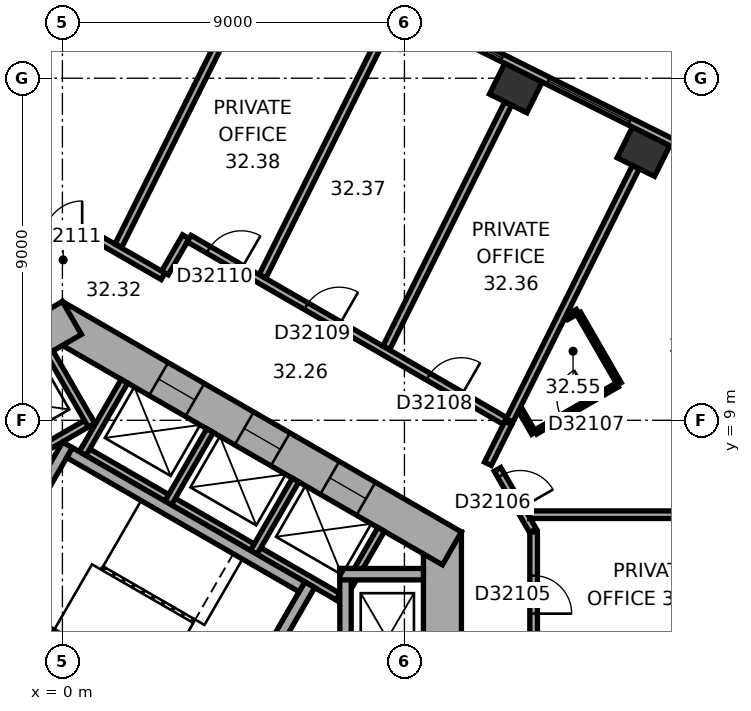
"""IFC4 building model, lengths in metres.
Left out: names, types, materials, properties, quantities, classifications, styles, units other than length and angle.
Written with IfcOpenShell. Run it as: python <this file> out.ifc"""

import sys

from ifc_helpers import new_model, si_unit, direction, frame, frame_2d, origin, origin_2d, place, context, subcontext, project, spatial, rectangle, extrude, element, fill, save


model = new_model("IFC4")
c1 = context("Model", 3, precision=1e-05, world=origin(), true_north=direction((0.0, 1.0)))
c2 = subcontext(c1, "Body", "Model", "MODEL_VIEW")
j1 = project(units=[si_unit("LENGTHUNIT", "METRE"), si_unit("PLANEANGLEUNIT", "RADIAN")], contexts=[c1])
p1 = place(None, origin())
s1 = spatial("IfcSite", under=j1, at=p1, CompositionType="ELEMENT")
p2 = place(p1, origin())
s2 = spatial("IfcBuilding", under=s1, at=p2, CompositionType="ELEMENT")
p3 = place(p2, frame((0.0, 0.0, 131.8)))
s3 = spatial("IfcBuildingStorey", under=s2, at=p3, CompositionType="ELEMENT", Elevation=131.8)
for number, where, z_axis, x_axis in (
    (1, (15.29, 16.065, 0.0), (0.0, 0.0, 1.0), (-0.895, 0.446, 0.0)),
    (2, (11.931, 17.74, 0.0), (0.0, 0.0, 1.0), (-0.895, 0.446, 0.0)),
):
    element("IfcColumn", number, at=place(p3, frame(where, z_axis=z_axis, x_axis=x_axis)), inside=s3, PredefinedType="COLUMN", context=c2, shape_type="SweptSolid", body=[
        extrude(rectangle(XDim=1.1, YDim=0.9, at=origin_2d()), origin(), (0.0, 0.0, 1.0), 3.7),
    ])
p4 = place(p3, frame((10.0, -6.062, 0.0), z_axis=(0.0, 0.0, 1.0), x_axis=(0.0, 1.0, 0.0)))
e3 = element("IfcWall", 3, at=p4, inside=s3, PredefinedType="SHEAR", context=c2, shape_type="SweptSolid", body=[
    extrude(rectangle(XDim=12.125, YDim=1.0, at=frame_2d((6.062, 0.0))), origin(), (0.0, 0.0, 1.0), 3.7),
])
p5 = place(p4, frame((6.262, 0.0, 0.0)))
e4 = element("IfcOpeningElement", 4, at=p5, cuts=e3, PredefinedType="OPENING", context=c2, shape_type="SweptSolid", body=[
    extrude(rectangle(XDim=1.5, YDim=2.1, at=frame_2d((0.75, 1.05))), frame((0.0, 0.51, 0.0), z_axis=(0.0, -1.0, 0.0), x_axis=(1.0, 0.0, 0.0)), (0.0, 0.0, 1.0), 1.02),
])
p6 = place(p4, frame((1.712, 0.0, 0.0)))
e5 = element("IfcOpeningElement", 5, at=p6, cuts=e3, PredefinedType="OPENING", context=c2, shape_type="SweptSolid", body=[
    extrude(rectangle(XDim=1.1, YDim=2.1, at=frame_2d((0.55, 1.05))), frame((0.0, 0.51, 0.0), z_axis=(0.0, -1.0, 0.0), x_axis=(1.0, 0.0, 0.0)), (0.0, 0.0, 1.0), 1.02),
])
p7 = place(p4, frame((4.312, 0.0, 0.0)))
e6 = element("IfcOpeningElement", 6, at=p7, cuts=e3, PredefinedType="OPENING", context=c2, shape_type="SweptSolid", body=[
    extrude(rectangle(XDim=1.1, YDim=2.1, at=frame_2d((0.55, 1.05))), frame((0.0, 0.51, 0.0), z_axis=(0.0, -1.0, 0.0), x_axis=(1.0, 0.0, 0.0)), (0.0, 0.0, 1.0), 1.02),
])
p8 = place(p3, frame((10.25, 5.629, 0.0), z_axis=(0.0, 0.0, 1.0), x_axis=(-0.866022616891, 0.50000482701, 0.0)))
e7 = element("IfcWall", 7, at=p8, inside=s3, PredefinedType="SHEAR", context=c2, shape_type="SweptSolid", body=[
    extrude(rectangle(XDim=12.125, YDim=1.0, at=frame_2d((6.062, 0.0))), origin(), (0.0, 0.0, 1.0), 3.7),
])
p9 = place(p8, frame((2.612, 0.0, 0.0)))
e8 = element("IfcOpeningElement", 8, at=p9, cuts=e7, PredefinedType="OPENING", context=c2, shape_type="SweptSolid", body=[
    extrude(rectangle(XDim=1.1, YDim=2.1, at=frame_2d((0.55, 1.05))), frame((0.0, 0.51, 0.0), z_axis=(0.0, -1.0, 0.0), x_axis=(1.0, 0.0, 0.0)), (0.0, 0.0, 1.0), 1.02),
])
p10 = place(p8, frame((5.212, 0.0, 0.0)))
e9 = element("IfcOpeningElement", 9, at=p10, cuts=e7, PredefinedType="OPENING", context=c2, shape_type="SweptSolid", body=[
    extrude(rectangle(XDim=1.1, YDim=2.1, at=frame_2d((0.55, 1.05))), frame((0.0, 0.51, 0.0), z_axis=(0.0, -1.0, 0.0), x_axis=(1.0, 0.0, 0.0)), (0.0, 0.0, 1.0), 1.02),
])
p11 = place(p8, frame((7.812, 0.0, 0.0)))
e10 = element("IfcOpeningElement", 10, at=p11, cuts=e7, PredefinedType="OPENING", context=c2, shape_type="SweptSolid", body=[
    extrude(rectangle(XDim=1.1, YDim=2.1, at=frame_2d((0.55, 1.05))), frame((0.0, 0.51, 0.0), z_axis=(0.0, -1.0, 0.0), x_axis=(1.0, 0.0, 0.0)), (0.0, 0.0, 1.0), 1.02),
])
p12 = place(p3, frame((0.25, 11.691, 0.0), z_axis=(0.0, 0.0, 1.0), x_axis=(-0.866022616891, -0.50000482701, 0.0)))
e11 = element("IfcWall", 11, at=p12, inside=s3, PredefinedType="SHEAR", context=c2, shape_type="SweptSolid", body=[
    extrude(rectangle(XDim=12.125, YDim=1.0, at=frame_2d((6.062, 0.0))), origin(), (0.0, 0.0, 1.0), 3.7),
])
p13 = place(p12, frame((6.262, 0.0, 0.0)))
e12 = element("IfcOpeningElement", 12, at=p13, cuts=e11, PredefinedType="OPENING", context=c2, shape_type="SweptSolid", body=[
    extrude(rectangle(XDim=1.5, YDim=2.1, at=frame_2d((0.75, 1.05))), frame((0.0, 0.51, 0.0), z_axis=(0.0, -1.0, 0.0), x_axis=(1.0, 0.0, 0.0)), (0.0, 0.0, 1.0), 1.02),
])
p14 = place(p12, frame((1.712, 0.0, 0.0)))
e13 = element("IfcOpeningElement", 13, at=p14, cuts=e11, PredefinedType="OPENING", context=c2, shape_type="SweptSolid", body=[
    extrude(rectangle(XDim=1.1, YDim=2.1, at=frame_2d((0.55, 1.05))), frame((0.0, 0.51, 0.0), z_axis=(0.0, -1.0, 0.0), x_axis=(1.0, 0.0, 0.0)), (0.0, 0.0, 1.0), 1.02),
])
p15 = place(p3, frame((19.464, 14.599, 0.0), z_axis=(0.0, 0.0, 1.0), x_axis=(-0.894935755043, 0.446195018289, 0.0)))
e14 = element("IfcWall", 14, at=p15, inside=s3, PredefinedType="STANDARD", context=c2, shape_type="SweptSolid", body=[
    extrude(rectangle(XDim=20.044, YDim=0.2, at=frame_2d((10.022, 0.0))), origin(), (0.0, 0.0, 1.0), 3.7),
])
p16 = place(p15, frame((1.313, 0.0, 0.9)))
e15 = element("IfcOpeningElement", 15, at=p16, cuts=e14, PredefinedType="OPENING", context=c2, shape_type="SweptSolid", body=[
    extrude(rectangle(XDim=2.4, YDim=2.0, at=frame_2d((1.2, 1.0))), frame((0.0, 0.11, 0.0), z_axis=(0.0, -1.0, 0.0), x_axis=(1.0, 0.0, 0.0)), (0.0, 0.0, 1.0), 0.22),
])
p17 = place(p15, frame((5.067, 0.0, 0.9)))
e16 = element("IfcOpeningElement", 16, at=p17, cuts=e14, PredefinedType="OPENING", context=c2, shape_type="SweptSolid", body=[
    extrude(rectangle(XDim=2.4, YDim=2.0, at=frame_2d((1.2, 1.0))), frame((0.0, 0.11, 0.0), z_axis=(0.0, -1.0, 0.0), x_axis=(1.0, 0.0, 0.0)), (0.0, 0.0, 1.0), 0.22),
])
p18 = place(p15, frame((8.821, 0.0, 0.9)))
e17 = element("IfcOpeningElement", 17, at=p18, cuts=e14, PredefinedType="OPENING", context=c2, shape_type="SweptSolid", body=[
    extrude(rectangle(XDim=2.4, YDim=2.0, at=frame_2d((1.2, 1.0))), frame((0.0, 0.11, 0.0), z_axis=(0.0, -1.0, 0.0), x_axis=(1.0, 0.0, 0.0)), (0.0, 0.0, 1.0), 0.22),
])
p19 = place(p15, frame((12.575, 0.0, 0.9)))
e18 = element("IfcOpeningElement", 18, at=p19, cuts=e14, PredefinedType="OPENING", context=c2, shape_type="SweptSolid", body=[
    extrude(rectangle(XDim=2.4, YDim=2.0, at=frame_2d((1.2, 1.0))), frame((0.0, 0.11, 0.0), z_axis=(0.0, -1.0, 0.0), x_axis=(1.0, 0.0, 0.0)), (0.0, 0.0, 1.0), 0.22),
])
p20 = place(p15, frame((16.329, 0.0, 0.9)))
e19 = element("IfcOpeningElement", 19, at=p20, cuts=e14, PredefinedType="OPENING", context=c2, shape_type="SweptSolid", body=[
    extrude(rectangle(XDim=2.4, YDim=2.0, at=frame_2d((1.2, 1.0))), frame((0.0, 0.11, 0.0), z_axis=(0.0, -1.0, 0.0), x_axis=(1.0, 0.0, 0.0)), (0.0, 0.0, 1.0), 0.22),
])
p21 = place(p3, frame((7.424, 4.259, 0.0), z_axis=(0.0, 0.0, 1.0), x_axis=(-0.866026010844, 0.49999894854, 0.0)))
e20 = element("IfcWall", 20, at=p21, inside=s3, PredefinedType="PARTITIONING", context=c2, shape_type="SweptSolid", body=[
    extrude(rectangle(XDim=8.0, YDim=0.2, at=frame_2d((4.0, 0.0))), origin(), (0.0, 0.0, 1.0), 3.42),
])
for number, where, z_axis, x_axis in (
    (21, (7.287, 4.222, 0.0), (0.0, 0.0, 1.0), (0.5, 0.866, 0.0)),
    (22, (5.036, 5.522, 0.0), (0.0, 0.0, 1.0), (0.5, 0.866, 0.0)),
    (23, (2.784, 6.822, 0.0), (0.0, 0.0, 1.0), (0.5, 0.866, 0.0)),
    (24, (0.532, 8.122, 0.0), (0.0, 0.0, 1.0), (0.5, 0.866, 0.0)),
):
    element("IfcWall", number, at=place(p3, frame(where, z_axis=z_axis, x_axis=x_axis)), inside=s3, PredefinedType="PARTITIONING", context=c2, shape_type="SweptSolid", body=[
        extrude(rectangle(XDim=2.2, YDim=0.2, at=frame_2d((1.1, 0.0))), origin(), (0.0, 0.0, 1.0), 3.42),
    ])
p22 = place(p3, frame((0.803, 9.009, 0.0), z_axis=(0.0, 0.0, 1.0), x_axis=(-0.866028230842, -0.499995103361, 0.0)))
e25 = element("IfcWall", 25, at=p22, inside=s3, PredefinedType="PARTITIONING", context=c2, shape_type="SweptSolid", body=[
    extrude(rectangle(XDim=5.4, YDim=0.2, at=frame_2d((2.7, 0.0))), origin(), (0.0, 0.0, 1.0), 3.42),
])
p23 = place(p3, frame((0.767, 8.872, 0.0), z_axis=(0.0, 0.0, 1.0), x_axis=(-0.499994660107, 0.866028486751, 0.0)))
e26 = element("IfcWall", 26, at=p23, inside=s3, PredefinedType="PARTITIONING", context=c2, shape_type="SweptSolid", body=[
    extrude(rectangle(XDim=2.2, YDim=0.2, at=frame_2d((1.1, 0.0))), origin(), (0.0, 0.0, 1.0), 3.42),
])
p24 = place(p3, frame((4.158, 0.602, 0.0), z_axis=(0.0, 0.0, 1.0), x_axis=(0.499977259774, 0.866038532462, 0.0)))
e27 = element("IfcWall", 27, at=p24, inside=s3, PredefinedType="SHEAR", context=c2, shape_type="SweptSolid", body=[
    extrude(rectangle(XDim=4.7, YDim=0.3, at=frame_2d((2.35, 0.0))), origin(), (0.0, 0.0, 1.0), 3.42),
])
p25 = place(p24, frame((0.8, 0.0, 0.0)))
e28 = element("IfcOpeningElement", 28, at=p25, cuts=e27, PredefinedType="OPENING", context=c2, shape_type="SweptSolid", body=[
    extrude(rectangle(XDim=1.2, YDim=2.1, at=frame_2d((0.6, 1.05))), frame((0.0, 0.16, 0.0), z_axis=(0.0, -1.0, 0.0), x_axis=(1.0, 0.0, 0.0)), (0.0, 0.0, 1.0), 0.32),
])
p26 = place(p3, frame((-2.216, 4.282, 0.0), z_axis=(0.0, 0.0, 1.0), x_axis=(0.499977259774, 0.866038532462, 0.0)))
e29 = element("IfcWall", 29, at=p26, inside=s3, PredefinedType="SHEAR", context=c2, shape_type="SweptSolid", body=[
    extrude(rectangle(XDim=4.7, YDim=0.3, at=frame_2d((2.35, 0.0))), origin(), (0.0, 0.0, 1.0), 3.42),
])
for number, where, z_axis, x_axis in (
    (30, (4.103, 0.807, 0.0), (0.0, 0.0, 1.0), (-0.866, 0.5, 0.0)),
    (31, (6.303, 4.617, 0.0), (0.0, 0.0, 1.0), (-0.866, 0.5, 0.0)),
):
    element("IfcWall", number, at=place(p3, frame(where, z_axis=z_axis, x_axis=x_axis)), inside=s3, PredefinedType="SHEAR", context=c2, shape_type="SweptSolid", body=[
        extrude(rectangle(XDim=7.06, YDim=0.3, at=frame_2d((3.53, 0.0))), origin(), (0.0, 0.0, 1.0), 3.42),
    ])
p27 = place(p3, frame((7.45, 1.75, 0.0), z_axis=(0.0, 0.0, 1.0), x_axis=(0.0, 1.0, 0.0)))
e32 = element("IfcWall", 32, at=p27, inside=s3, PredefinedType="SHEAR", context=c2, shape_type="SweptSolid", body=[
    extrude(rectangle(XDim=3.35, YDim=0.3, at=frame_2d((1.675, 0.0))), origin(), (0.0, 0.0, 1.0), 3.42),
])
p28 = place(p3, frame((7.3, 4.95, 0.0), z_axis=(0.0, 0.0, 1.0), x_axis=(1.0, 0.0, 0.0)))
e33 = element("IfcWall", 33, at=p28, inside=s3, PredefinedType="SHEAR", context=c2, shape_type="SweptSolid", body=[
    extrude(rectangle(XDim=2.2, YDim=0.3, at=frame_2d((1.1, 0.0))), origin(), (0.0, 0.0, 1.0), 3.42),
])
p29 = place(p3, frame((0.95, 13.77, 0.0), z_axis=(0.0, 0.0, 1.0), x_axis=(-1.0, 0.0, 0.0)))
e34 = element("IfcWall", 34, at=p29, inside=s3, PredefinedType="PARTITIONING", context=c2, shape_type="SweptSolid", body=[
    extrude(rectangle(XDim=1.86, YDim=0.2, at=frame_2d((0.93, 0.0))), origin(), (0.0, 0.0, 1.0), 3.42),
])
p30 = place(p29, frame((0.43, 0.0, 0.0)))
e35 = element("IfcOpeningElement", 35, at=p30, cuts=e34, PredefinedType="OPENING", context=c2, shape_type="SweptSolid", body=[
    extrude(rectangle(XDim=1.0, YDim=2.1, at=frame_2d((0.5, 1.05))), frame((0.0, 0.11, 0.0), z_axis=(0.0, -1.0, 0.0), x_axis=(1.0, 0.0, 0.0)), (0.0, 0.0, 1.0), 0.22),
])
p31 = place(p3, frame((2.648, 12.789, 0.0), z_axis=(0.0, 0.0, 1.0), x_axis=(-0.8660607342, 0.499938800931, 0.0)))
e36 = element("IfcWall", 36, at=p31, inside=s3, PredefinedType="PARTITIONING", context=c2, shape_type="SweptSolid", body=[
    extrude(rectangle(XDim=1.921, YDim=0.2, at=frame_2d((0.96, 0.0))), origin(), (0.0, 0.0, 1.0), 3.42),
])
p32 = place(p3, frame((3.249, 13.829, 0.0), z_axis=(0.0, 0.0, 1.0), x_axis=(-0.499812034598, -0.866133898465, 0.0)))
e37 = element("IfcWall", 37, at=p32, inside=s3, PredefinedType="PARTITIONING", context=c2, shape_type="SweptSolid", body=[
    extrude(rectangle(XDim=1.101, YDim=0.2, at=frame_2d((0.551, 0.0))), origin(), (0.0, 0.0, 1.0), 3.42),
])
p33 = place(p3, frame((5.01, 20.688, 0.0), z_axis=(0.0, 0.0, 1.0), x_axis=(-0.446203062394, -0.894931744386, 0.0)))
e38 = element("IfcWall", 38, at=p33, inside=s3, PredefinedType="PARTITIONING", context=c2, shape_type="SweptSolid", body=[
    extrude(rectangle(XDim=7.927, YDim=0.2, at=frame_2d((3.963, 0.0))), origin(), (0.0, 0.0, 1.0), 2.87),
])
p34 = place(p3, frame((8.37, 19.013, 0.0), z_axis=(0.0, 0.0, 1.0), x_axis=(-0.446187985757, -0.894939261272, 0.0)))
e39 = element("IfcWall", 39, at=p34, inside=s3, PredefinedType="PARTITIONING", context=c2, shape_type="SweptSolid", body=[
    extrude(rectangle(XDim=6.953, YDim=0.2, at=frame_2d((3.477, 0.0))), origin(), (0.0, 0.0, 1.0), 3.42),
])
p35 = place(p3, frame((11.196, 7.854, 0.0), z_axis=(0.0, 0.0, 1.0), x_axis=(0.446241040303, 0.894912808015, 0.0)))
e40 = element("IfcWall", 40, at=p35, inside=s3, PredefinedType="PARTITIONING", context=c2, shape_type="SweptSolid", body=[
    extrude(rectangle(XDim=1.205, YDim=0.2, at=frame_2d((0.603, 0.0))), origin(), (0.0, 0.0, 1.0), 3.42),
])
p36 = place(p3, frame((11.646, 8.981, 0.0), z_axis=(0.0, 0.0, 1.0), x_axis=(-0.866027142779, 0.499996987961, 0.0)))
e41 = element("IfcWall", 41, at=p36, inside=s3, PredefinedType="PARTITIONING", context=c2, shape_type="SweptSolid", body=[
    extrude(rectangle(XDim=9.597, YDim=0.2, at=frame_2d((4.798, 0.0))), origin(), (0.0, 0.0, 1.0), 3.42),
])
p37 = place(p36, frame((1.331, 0.0, 0.0)))
e42 = element("IfcOpeningElement", 42, at=p37, cuts=e41, PredefinedType="OPENING", context=c2, shape_type="SweptSolid", body=[
    extrude(rectangle(XDim=1.0, YDim=2.1, at=frame_2d((0.5, 1.05))), frame((0.0, 0.11, 0.0), z_axis=(0.0, -1.0, 0.0), x_axis=(1.0, 0.0, 0.0)), (0.0, 0.0, 1.0), 0.22),
])
p38 = place(p36, frame((5.042, 0.0, 0.0)))
e43 = element("IfcOpeningElement", 43, at=p38, cuts=e41, PredefinedType="OPENING", context=c2, shape_type="SweptSolid", body=[
    extrude(rectangle(XDim=1.0, YDim=2.1, at=frame_2d((0.5, 1.05))), frame((0.0, 0.11, 0.0), z_axis=(0.0, -1.0, 0.0), x_axis=(1.0, 0.0, 0.0)), (0.0, 0.0, 1.0), 0.22),
])
p39 = place(p36, frame((8.01, 0.0, 0.0)))
e44 = element("IfcOpeningElement", 44, at=p39, cuts=e41, PredefinedType="OPENING", context=c2, shape_type="SweptSolid", body=[
    extrude(rectangle(XDim=1.0, YDim=2.1, at=frame_2d((0.5, 1.05))), frame((0.0, 0.11, 0.0), z_axis=(0.0, -1.0, 0.0), x_axis=(1.0, 0.0, 0.0)), (0.0, 0.0, 1.0), 0.22),
])
p40 = place(p3, frame((11.73, 17.338, 0.0), z_axis=(0.0, 0.0, 1.0), x_axis=(-0.446193589186, -0.894936467561, 0.0)))
e45 = element("IfcWall", 45, at=p40, inside=s3, PredefinedType="PARTITIONING", context=c2, shape_type="SweptSolid", body=[
    extrude(rectangle(XDim=7.183, YDim=0.2, at=frame_2d((3.591, 0.0))), origin(), (0.0, 0.0, 1.0), 2.87),
])
p41 = place(p3, frame((12.38, 6.097, 0.0), z_axis=(0.0, 0.0, 1.0), x_axis=(-0.499964847546, 0.866045698112, 0.0)))
e46 = element("IfcWall", 46, at=p41, inside=s3, PredefinedType="PARTITIONING", context=c2, shape_type="SweptSolid", body=[
    extrude(rectangle(XDim=1.86, YDim=0.2, at=frame_2d((0.93, 0.0))), origin(), (0.0, 0.0, 1.0), 3.42),
])
p42 = place(p41, frame((0.672, 0.0, 0.0)))
e47 = element("IfcOpeningElement", 47, at=p42, cuts=e46, PredefinedType="OPENING", context=c2, shape_type="SweptSolid", body=[
    extrude(rectangle(XDim=1.0, YDim=2.1, at=frame_2d((0.5, 1.05))), frame((0.0, 0.11, 0.0), z_axis=(0.0, -1.0, 0.0), x_axis=(1.0, 0.0, 0.0)), (0.0, 0.0, 1.0), 0.22),
])
p43 = place(p3, frame((12.4, 0.201, 0.0), z_axis=(0.0, 0.0, 1.0), x_axis=(0.0, 1.0, 0.0)))
e48 = element("IfcWall", 48, at=p43, inside=s3, PredefinedType="PARTITIONING", context=c2, shape_type="SweptSolid", body=[
    extrude(rectangle(XDim=5.861, YDim=0.2, at=frame_2d((2.931, 0.0))), origin(), (0.0, 0.0, 1.0), 3.42),
])
p44 = place(p43, frame((3.711, 0.0, 0.0)))
e49 = element("IfcOpeningElement", 49, at=p44, cuts=e48, PredefinedType="OPENING", context=c2, shape_type="SweptSolid", body=[
    extrude(rectangle(XDim=1.0, YDim=2.1, at=frame_2d((0.5, 1.05))), frame((0.0, 0.11, 0.0), z_axis=(0.0, -1.0, 0.0), x_axis=(1.0, 0.0, 0.0)), (0.0, 0.0, 1.0), 0.22),
])
p45 = place(p3, frame((12.401, 8.661, 0.0), z_axis=(0.0, 0.0, 1.0), x_axis=(-0.499831418649, 0.866122712398, 0.0)))
e50 = element("IfcWall", 50, at=p45, inside=s3, PredefinedType="PARTITIONING", context=c2, shape_type="SweptSolid", body=[
    extrude(rectangle(XDim=0.711, YDim=0.12, at=frame_2d((0.355, 0.0))), origin(), (0.0, 0.0, 1.0), 3.42),
])
p46 = place(p3, frame((13.269, 11.702, 0.0), z_axis=(0.0, 0.0, 1.0), x_axis=(0.865936922628, 0.500153222552, 0.0)))
e51 = element("IfcWall", 51, at=p46, inside=s3, PredefinedType="PARTITIONING", context=c2, shape_type="SweptSolid", body=[
    extrude(rectangle(XDim=0.327, YDim=0.12, at=frame_2d((0.164, 0.0))), origin(), (0.0, 0.0, 1.0), 3.42),
])
p47 = place(p3, frame((13.583, 11.814, 0.0), z_axis=(0.0, 0.0, 1.0), x_axis=(0.500028586798, -0.86600889856, 0.0)))
e52 = element("IfcWall", 52, at=p47, inside=s3, PredefinedType="PARTITIONING", context=c2, shape_type="SweptSolid", body=[
    extrude(rectangle(XDim=2.14, YDim=0.12, at=frame_2d((1.07, 0.0))), origin(), (0.0, 0.0, 1.0), 3.42),
])
p48 = place(p3, frame((14.601, 9.931, 0.0), z_axis=(0.0, 0.0, 1.0), x_axis=(-0.866023285932, -0.50000366821, 0.0)))
e53 = element("IfcWall", 53, at=p48, inside=s3, PredefinedType="PARTITIONING", context=c2, shape_type="SweptSolid", body=[
    extrude(rectangle(XDim=2.48, YDim=0.12, at=frame_2d((1.24, 0.0))), origin(), (0.0, 0.0, 1.0), 3.42),
])
p49 = place(p48, frame((0.79, 0.0, 0.0)))
e54 = element("IfcOpeningElement", 54, at=p49, cuts=e53, PredefinedType="OPENING", context=c2, shape_type="SweptSolid", body=[
    extrude(rectangle(XDim=0.9, YDim=2.1, at=frame_2d((0.45, 1.05))), frame((0.0, 0.07, 0.0), z_axis=(0.0, -1.0, 0.0), x_axis=(1.0, 0.0, 0.0)), (0.0, 0.0, 1.0), 0.14),
])
p50 = place(p3, frame((15.09, 15.663, 0.0), z_axis=(0.0, 0.0, 1.0), x_axis=(-0.446203977428, -0.89493128816, 0.0)))
e55 = element("IfcWall", 55, at=p50, inside=s3, PredefinedType="PARTITIONING", context=c2, shape_type="SweptSolid", body=[
    extrude(rectangle(XDim=7.45, YDim=0.2, at=frame_2d((3.725, 0.0))), origin(), (0.0, 0.0, 1.0), 3.42),
])
p51 = place(p3, frame((20.75, 6.515, 0.0), z_axis=(0.0, 0.0, 1.0), x_axis=(-1.0, 0.0, 0.0)))
e56 = element("IfcWall", 56, at=p51, inside=s3, PredefinedType="PARTITIONING", context=c2, shape_type="SweptSolid", body=[
    extrude(rectangle(XDim=8.452, YDim=0.2, at=frame_2d((4.226, 0.0))), origin(), (0.0, 0.0, 1.0), 3.42),
])
p52 = place(p17, origin())
e57 = element("IfcWindow", 57, at=p52, inside=s3, PartitioningType="SINGLE_PANEL", PredefinedType="WINDOW", context=c2, shape_type="SweptSolid", body=[
    extrude(rectangle(XDim=2.4, YDim=2.0, at=frame_2d((1.2, 1.0))), frame((0.0, 0.03, 0.0), z_axis=(0.0, -1.0, 0.0), x_axis=(1.0, 0.0, 0.0)), (0.0, 0.0, 1.0), 0.06),
])
fill(e16, e57)
p53 = place(p18, origin())
e58 = element("IfcWindow", 58, at=p53, inside=s3, PartitioningType="SINGLE_PANEL", PredefinedType="WINDOW", context=c2, shape_type="SweptSolid", body=[
    extrude(rectangle(XDim=2.4, YDim=2.0, at=frame_2d((1.2, 1.0))), frame((0.0, 0.03, 0.0), z_axis=(0.0, -1.0, 0.0), x_axis=(1.0, 0.0, 0.0)), (0.0, 0.0, 1.0), 0.06),
])
fill(e17, e58)
p54 = place(p9, origin())
e59 = element("IfcDoor", 59, at=p54, inside=s3, OperationType="DOUBLE_DOOR_SLIDING", PredefinedType="DOOR", context=c2, shape_type="SweptSolid", body=[
    extrude(rectangle(XDim=1.1, YDim=2.1, at=frame_2d((0.55, 1.05))), frame((0.0, 0.025, 0.0), z_axis=(0.0, -1.0, 0.0), x_axis=(1.0, 0.0, 0.0)), (0.0, 0.0, 1.0), 0.05),
])
fill(e8, e59)
p55 = place(p10, origin())
e60 = element("IfcDoor", 60, at=p55, inside=s3, OperationType="DOUBLE_DOOR_SLIDING", PredefinedType="DOOR", context=c2, shape_type="SweptSolid", body=[
    extrude(rectangle(XDim=1.1, YDim=2.1, at=frame_2d((0.55, 1.05))), frame((0.0, 0.025, 0.0), z_axis=(0.0, -1.0, 0.0), x_axis=(1.0, 0.0, 0.0)), (0.0, 0.0, 1.0), 0.05),
])
fill(e9, e60)
p56 = place(p11, origin())
e61 = element("IfcDoor", 61, at=p56, inside=s3, OperationType="DOUBLE_DOOR_SLIDING", PredefinedType="DOOR", context=c2, shape_type="SweptSolid", body=[
    extrude(rectangle(XDim=1.1, YDim=2.1, at=frame_2d((0.55, 1.05))), frame((0.0, 0.025, 0.0), z_axis=(0.0, -1.0, 0.0), x_axis=(1.0, 0.0, 0.0)), (0.0, 0.0, 1.0), 0.05),
])
fill(e10, e61)
p57 = place(p44, origin())
e62 = element("IfcDoor", 62, at=p57, inside=s3, OperationType="SINGLE_SWING_LEFT", PredefinedType="DOOR", context=c2, shape_type="SweptSolid", body=[
    extrude(rectangle(XDim=1.0, YDim=2.1, at=frame_2d((0.5, 1.05))), frame((0.0, 0.025, 0.0), z_axis=(0.0, -1.0, 0.0), x_axis=(1.0, 0.0, 0.0)), (0.0, 0.0, 1.0), 0.05),
])
fill(e49, e62)
p58 = place(p42, origin())
e63 = element("IfcDoor", 63, at=p58, inside=s3, OperationType="SINGLE_SWING_LEFT", PredefinedType="DOOR", context=c2, shape_type="SweptSolid", body=[
    extrude(rectangle(XDim=1.0, YDim=2.1, at=frame_2d((0.5, 1.05))), frame((0.0, 0.025, 0.0), z_axis=(0.0, -1.0, 0.0), x_axis=(1.0, 0.0, 0.0)), (0.0, 0.0, 1.0), 0.05),
])
fill(e47, e63)
p59 = place(p49, origin())
e64 = element("IfcDoor", 64, at=p59, inside=s3, OperationType="SINGLE_SWING_LEFT", PredefinedType="DOOR", context=c2, shape_type="SweptSolid", body=[
    extrude(rectangle(XDim=0.9, YDim=2.1, at=frame_2d((0.45, 1.05))), frame((0.0, 0.025, 0.0), z_axis=(0.0, -1.0, 0.0), x_axis=(1.0, 0.0, 0.0)), (0.0, 0.0, 1.0), 0.05),
])
fill(e54, e64)
p60 = place(p37, origin())
e65 = element("IfcDoor", 65, at=p60, inside=s3, OperationType="SINGLE_SWING_LEFT", PredefinedType="DOOR", context=c2, shape_type="SweptSolid", body=[
    extrude(rectangle(XDim=1.0, YDim=2.1, at=frame_2d((0.5, 1.05))), frame((0.0, 0.025, 0.0), z_axis=(0.0, -1.0, 0.0), x_axis=(1.0, 0.0, 0.0)), (0.0, 0.0, 1.0), 0.05),
])
fill(e42, e65)
p61 = place(p38, origin())
e66 = element("IfcDoor", 66, at=p61, inside=s3, OperationType="SINGLE_SWING_LEFT", PredefinedType="DOOR", context=c2, shape_type="SweptSolid", body=[
    extrude(rectangle(XDim=1.0, YDim=2.1, at=frame_2d((0.5, 1.05))), frame((0.0, 0.025, 0.0), z_axis=(0.0, -1.0, 0.0), x_axis=(1.0, 0.0, 0.0)), (0.0, 0.0, 1.0), 0.05),
])
fill(e43, e66)
p62 = place(p39, origin())
e67 = element("IfcDoor", 67, at=p62, inside=s3, OperationType="SINGLE_SWING_LEFT", PredefinedType="DOOR", context=c2, shape_type="SweptSolid", body=[
    extrude(rectangle(XDim=1.0, YDim=2.1, at=frame_2d((0.5, 1.05))), frame((0.0, 0.025, 0.0), z_axis=(0.0, -1.0, 0.0), x_axis=(1.0, 0.0, 0.0)), (0.0, 0.0, 1.0), 0.05),
])
fill(e44, e67)
p63 = place(p30, origin())
e68 = element("IfcDoor", 68, at=p63, inside=s3, OperationType="SINGLE_SWING_LEFT", PredefinedType="DOOR", context=c2, shape_type="SweptSolid", body=[
    extrude(rectangle(XDim=1.0, YDim=2.1, at=frame_2d((0.5, 1.05))), frame((0.0, 0.025, 0.0), z_axis=(0.0, -1.0, 0.0), x_axis=(1.0, 0.0, 0.0)), (0.0, 0.0, 1.0), 0.05),
])
fill(e35, e68)
save(model, sys.argv[1])
